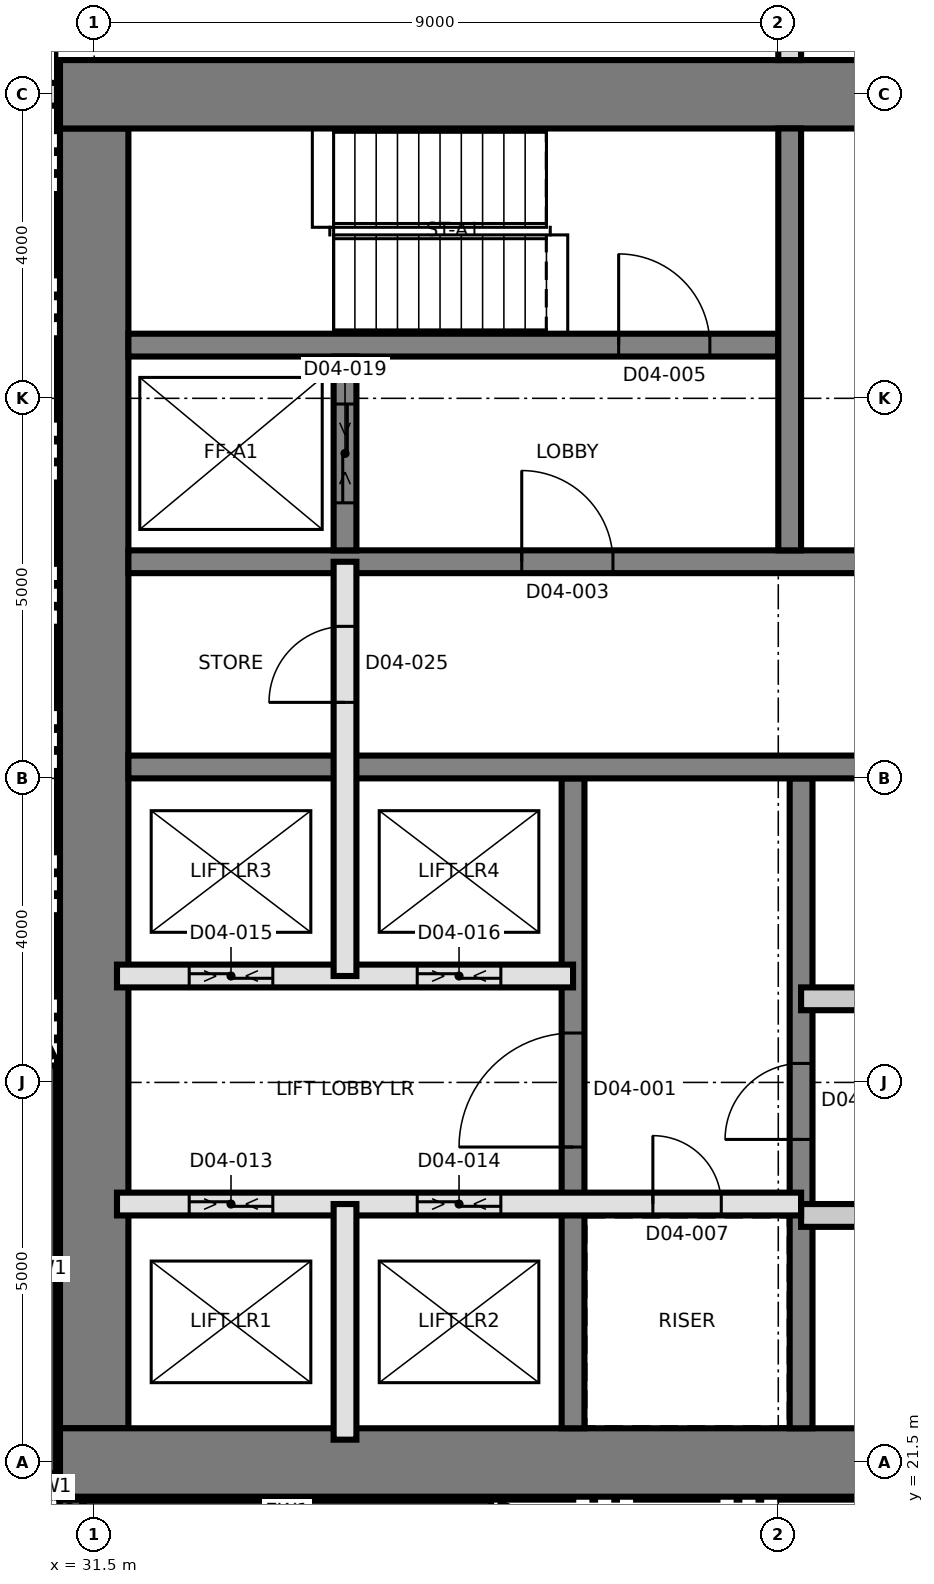
"""IFC4 building model, lengths in metres.
Left out: names, types, materials, properties, quantities, classifications, styles, units other than length and angle.
Written with IfcOpenShell. Run it as: python <this file> out.ifc"""

import sys

from ifc_helpers import new_model, si_unit, direction, frame, frame_2d, origin, place, context, subcontext, project, spatial, rectangle, extrude, element, fill, save


model = new_model("IFC4")
c1 = context("Model", 3, precision=1e-05, world=origin(), true_north=direction((0.0, 1.0)))
c2 = subcontext(c1, "Body", "Model", "MODEL_VIEW")
j1 = project(units=[si_unit("LENGTHUNIT", "METRE"), si_unit("PLANEANGLEUNIT", "RADIAN")], contexts=[c1])
p1 = place(None, origin())
s1 = spatial("IfcSite", under=j1, at=p1, CompositionType="ELEMENT")
p2 = place(p1, origin())
s2 = spatial("IfcBuilding", under=s1, at=p2, CompositionType="ELEMENT")
p3 = place(p2, frame((0.0, 0.0, 66.8)))
s3 = spatial("IfcBuildingStorey", under=s2, at=p3, CompositionType="ELEMENT", Elevation=66.8)
p4 = place(p3, frame((31.5, 21.95, 0.0), z_axis=(0.0, 0.0, 1.0), x_axis=(0.0, 1.0, 0.0)))
e1 = element("IfcWall", 1, at=p4, inside=s3, PredefinedType="SHEAR", context=c2, shape_type="SweptSolid", body=[
    extrude(rectangle(XDim=17.1, YDim=0.9, at=frame_2d((8.55, 0.0))), origin(), (0.0, 0.0, 1.0), 3.7),
])
p5 = place(p3, frame((31.05, 21.5, 0.0), z_axis=(0.0, 0.0, 1.0), x_axis=(1.0, 0.0, 0.0)))
e2 = element("IfcWall", 2, at=p5, inside=s3, PredefinedType="SHEAR", context=c2, shape_type="SweptSolid", body=[
    extrude(rectangle(XDim=27.0, YDim=0.9, at=frame_2d((13.5, 0.0))), origin(), (0.0, 0.0, 1.0), 3.7),
])
p6 = place(p3, frame((31.05, 39.5, 0.0), z_axis=(0.0, 0.0, 1.0), x_axis=(1.0, 0.0, 0.0)))
e3 = element("IfcWall", 3, at=p6, inside=s3, PredefinedType="SHEAR", context=c2, shape_type="SweptSolid", body=[
    extrude(rectangle(XDim=27.0, YDim=0.9, at=frame_2d((13.5, 0.0))), origin(), (0.0, 0.0, 1.0), 3.7),
])
p7 = place(p6, frame((10.65, 0.0, 0.0)))
e4 = element("IfcOpeningElement", 4, at=p7, cuts=e3, PredefinedType="OPENING", context=c2, shape_type="SweptSolid", body=[
    extrude(rectangle(XDim=1.2, YDim=2.1, at=frame_2d((0.6, 1.05))), frame((0.0, 0.46, 0.0), z_axis=(0.0, -1.0, 0.0), x_axis=(1.0, 0.0, 0.0)), (0.0, 0.0, 1.0), 0.92),
])
p8 = place(p3, frame((37.8, 21.95, 0.0), z_axis=(0.0, 0.0, 1.0), x_axis=(0.0, 1.0, 0.0)))
e5 = element("IfcWall", 5, at=p8, inside=s3, PredefinedType="SHEAR", context=c2, shape_type="SweptSolid", body=[
    extrude(rectangle(XDim=8.55, YDim=0.3, at=frame_2d((4.275, 0.0))), origin(), (0.0, 0.0, 1.0), 3.7),
])
p9 = place(p8, frame((3.7, 0.0, 0.0)))
e6 = element("IfcOpeningElement", 6, at=p9, cuts=e5, PredefinedType="OPENING", context=c2, shape_type="SweptSolid", body=[
    extrude(rectangle(XDim=1.5, YDim=2.1, at=frame_2d((0.75, 1.05))), frame((0.0, 0.16, 0.0), z_axis=(0.0, -1.0, 0.0), x_axis=(1.0, 0.0, 0.0)), (0.0, 0.0, 1.0), 0.32),
])
p10 = place(p3, frame((40.8, 21.95, 0.0), z_axis=(0.0, 0.0, 1.0), x_axis=(0.0, 1.0, 0.0)))
e7 = element("IfcWall", 7, at=p10, inside=s3, PredefinedType="SHEAR", context=c2, shape_type="SweptSolid", body=[
    extrude(rectangle(XDim=8.55, YDim=0.3, at=frame_2d((4.275, 0.0))), origin(), (0.0, 0.0, 1.0), 3.7),
])
p11 = place(p10, frame((3.8, 0.0, 0.0)))
e8 = element("IfcOpeningElement", 8, at=p11, cuts=e7, PredefinedType="OPENING", context=c2, shape_type="SweptSolid", body=[
    extrude(rectangle(XDim=1.0, YDim=2.1, at=frame_2d((0.5, 1.05))), frame((0.0, 0.16, 0.0), z_axis=(0.0, -1.0, 0.0), x_axis=(1.0, 0.0, 0.0)), (0.0, 0.0, 1.0), 0.32),
])
p12 = place(p3, frame((31.95, 30.65, 0.0), z_axis=(0.0, 0.0, 1.0), x_axis=(1.0, 0.0, 0.0)))
e9 = element("IfcWall", 9, at=p12, inside=s3, PredefinedType="SHEAR", context=c2, shape_type="SweptSolid", body=[
    extrude(rectangle(XDim=26.1, YDim=0.3, at=frame_2d((13.05, 0.0))), origin(), (0.0, 0.0, 1.0), 3.7),
])
p13 = place(p12, frame((24.55, 0.0, 0.0)))
e10 = element("IfcOpeningElement", 10, at=p13, cuts=e9, PredefinedType="OPENING", context=c2, shape_type="SweptSolid", body=[
    extrude(rectangle(XDim=1.0, YDim=2.1, at=frame_2d((0.5, 1.05))), frame((0.0, 0.16, 0.0), z_axis=(0.0, -1.0, 0.0), x_axis=(1.0, 0.0, 0.0)), (0.0, 0.0, 1.0), 0.32),
])
p14 = place(p12, frame((11.35, 0.0, 0.0)))
e11 = element("IfcOpeningElement", 11, at=p14, cuts=e9, PredefinedType="OPENING", context=c2, shape_type="SweptSolid", body=[
    extrude(rectangle(XDim=1.0, YDim=2.1, at=frame_2d((0.5, 1.05))), frame((0.0, 0.16, 0.0), z_axis=(0.0, -1.0, 0.0), x_axis=(1.0, 0.0, 0.0)), (0.0, 0.0, 1.0), 0.32),
])
p15 = place(p3, frame((31.95, 33.35, 0.0), z_axis=(0.0, 0.0, 1.0), x_axis=(1.0, 0.0, 0.0)))
e12 = element("IfcWall", 12, at=p15, inside=s3, PredefinedType="SHEAR", context=c2, shape_type="SweptSolid", body=[
    extrude(rectangle(XDim=26.1, YDim=0.3, at=frame_2d((13.05, 0.0))), origin(), (0.0, 0.0, 1.0), 3.7),
])
p16 = place(p15, frame((13.7, 0.0, 0.0)))
e13 = element("IfcOpeningElement", 13, at=p16, cuts=e12, PredefinedType="OPENING", context=c2, shape_type="SweptSolid", body=[
    extrude(rectangle(XDim=1.4, YDim=2.1, at=frame_2d((0.7, 1.05))), frame((0.0, 0.16, 0.0), z_axis=(0.0, -1.0, 0.0), x_axis=(1.0, 0.0, 0.0)), (0.0, 0.0, 1.0), 0.32),
])
p17 = place(p15, frame((5.175, 0.0, 0.0)))
e14 = element("IfcOpeningElement", 14, at=p17, cuts=e12, PredefinedType="OPENING", context=c2, shape_type="SweptSolid", body=[
    extrude(rectangle(XDim=1.2, YDim=2.1, at=frame_2d((0.6, 1.05))), frame((0.0, 0.16, 0.0), z_axis=(0.0, -1.0, 0.0), x_axis=(1.0, 0.0, 0.0)), (0.0, 0.0, 1.0), 0.32),
])
p18 = place(p15, frame((19.725, 0.0, 0.0)))
e15 = element("IfcOpeningElement", 15, at=p18, cuts=e12, PredefinedType="OPENING", context=c2, shape_type="SweptSolid", body=[
    extrude(rectangle(XDim=1.2, YDim=2.1, at=frame_2d((0.6, 1.05))), frame((0.0, 0.16, 0.0), z_axis=(0.0, -1.0, 0.0), x_axis=(1.0, 0.0, 0.0)), (0.0, 0.0, 1.0), 0.32),
])
p19 = place(p3, frame((31.95, 36.2, 0.0), z_axis=(0.0, 0.0, 1.0), x_axis=(1.0, 0.0, 0.0)))
e16 = element("IfcWall", 16, at=p19, inside=s3, PredefinedType="SHEAR", context=c2, shape_type="SweptSolid", body=[
    extrude(rectangle(XDim=8.55, YDim=0.3, at=frame_2d((4.275, 0.0))), origin(), (0.0, 0.0, 1.0), 3.7),
])
p20 = place(p19, frame((6.45, 0.0, 0.0)))
e17 = element("IfcOpeningElement", 17, at=p20, cuts=e16, PredefinedType="OPENING", context=c2, shape_type="SweptSolid", body=[
    extrude(rectangle(XDim=1.2, YDim=2.1, at=frame_2d((0.6, 1.05))), frame((0.0, 0.16, 0.0), z_axis=(0.0, -1.0, 0.0), x_axis=(1.0, 0.0, 0.0)), (0.0, 0.0, 1.0), 0.32),
])
p21 = place(p3, frame((40.65, 33.5, 0.0), z_axis=(0.0, 0.0, 1.0), x_axis=(0.0, 1.0, 0.0)))
e18 = element("IfcWall", 18, at=p21, inside=s3, PredefinedType="SHEAR", context=c2, shape_type="SweptSolid", body=[
    extrude(rectangle(XDim=5.55, YDim=0.3, at=frame_2d((2.775, 0.0))), origin(), (0.0, 0.0, 1.0), 3.7),
])
p22 = place(p3, frame((34.8, 33.5, 0.0), z_axis=(0.0, 0.0, 1.0), x_axis=(0.0, 1.0, 0.0)))
e19 = element("IfcWall", 19, at=p22, inside=s3, PredefinedType="SHEAR", context=c2, shape_type="SweptSolid", body=[
    extrude(rectangle(XDim=2.55, YDim=0.3, at=frame_2d((1.275, 0.0))), origin(), (0.0, 0.0, 1.0), 3.7),
])
p23 = place(p22, frame((0.625, 0.0, 0.0)))
e20 = element("IfcOpeningElement", 20, at=p23, cuts=e19, PredefinedType="OPENING", context=c2, shape_type="SweptSolid", body=[
    extrude(rectangle(XDim=1.3, YDim=2.4, at=frame_2d((0.65, 1.2))), frame((0.0, 0.16, 0.0), z_axis=(0.0, -1.0, 0.0), x_axis=(1.0, 0.0, 0.0)), (0.0, 0.0, 1.0), 0.32),
])
p24 = place(p3, frame((30.85, 26.722, 0.0), z_axis=(0.0, 0.0, 1.0), x_axis=(0.0, -1.0, 0.0)))
e21 = element("IfcWall", 21, at=p24, inside=s3, PredefinedType="SOLIDWALL", context=c2, shape_type="SweptSolid", body=[
    extrude(rectangle(XDim=5.362, YDim=0.3, at=frame_2d((2.681, 0.0))), origin(), (0.0, 0.0, 1.0), 3.4),
])
for number, where, z_axis, x_axis in (
    (22, (30.861, 21.302, 0.0), (0.0, 0.0, 1.0), (0.383, -0.924, 0.0)),
    (23, (31.048, 20.967, 0.0), (0.0, 0.0, 1.0), (0.924, -0.383, 0.0)),
):
    element("IfcWall", number, at=place(p3, frame(where, z_axis=z_axis, x_axis=x_axis)), inside=s3, PredefinedType="SOLIDWALL", context=c2, shape_type="SweptSolid", body=[
        extrude(rectangle(XDim=0.275, YDim=0.3, at=frame_2d((0.138, 0.0))), origin(), (0.0, 0.0, 1.0), 3.4),
    ])
p25 = place(p3, frame((31.36, 20.85, 0.0), z_axis=(0.0, 0.0, 1.0), x_axis=(1.0, 0.0, 0.0)))
e24 = element("IfcWall", 24, at=p25, inside=s3, PredefinedType="SOLIDWALL", context=c2, shape_type="SweptSolid", body=[
    extrude(rectangle(XDim=5.362, YDim=0.3, at=frame_2d((2.681, 0.0))), origin(), (0.0, 0.0, 1.0), 3.4),
])
for number, where, z_axis, x_axis in (
    (25, (36.788, 20.834, 0.0), (0.0, 0.0, 1.0), (0.897, -0.442, 0.0)),
    (26, (30.119, 28.24, 0.0), (0.0, 0.0, 1.0), (0.442, -0.897, 0.0)),
):
    element("IfcWall", number, at=place(p3, frame(where, z_axis=z_axis, x_axis=x_axis)), inside=s3, PredefinedType="SOLIDWALL", context=c2, shape_type="SweptSolid", body=[
        extrude(rectangle(XDim=1.618, YDim=0.3, at=frame_2d((0.809, 0.0))), origin(), (0.0, 0.0, 1.0), 3.4),
    ])
p26 = place(p3, frame((40.8, 24.75, 0.0), z_axis=(0.0, 0.0, 1.0), x_axis=(1.0, 0.0, 0.0)))
e27 = element("IfcWall", 27, at=p26, inside=s3, PredefinedType="PARTITIONING", context=c2, shape_type="SweptSolid", body=[
    extrude(rectangle(XDim=6.0, YDim=0.3, at=frame_2d((3.0, 0.0))), origin(), (0.0, 0.0, 1.0), 3.4),
])
p27 = place(p26, frame((2.5, 0.0, 0.0)))
e28 = element("IfcOpeningElement", 28, at=p27, cuts=e27, PredefinedType="OPENING", context=c2, shape_type="SweptSolid", body=[
    extrude(rectangle(XDim=1.0, YDim=2.1, at=frame_2d((0.5, 1.05))), frame((0.0, 0.16, 0.0), z_axis=(0.0, -1.0, 0.0), x_axis=(1.0, 0.0, 0.0)), (0.0, 0.0, 1.0), 0.32),
])
p28 = place(p3, frame((31.8, 24.9, 0.0), z_axis=(0.0, 0.0, 1.0), x_axis=(1.0, 0.0, 0.0)))
e29 = element("IfcWall", 29, at=p28, inside=s3, PredefinedType="SOLIDWALL", context=c2, shape_type="SweptSolid", body=[
    extrude(rectangle(XDim=9.0, YDim=0.3, at=frame_2d((4.5, 0.0))), origin(), (0.0, 0.0, 1.0), 3.4),
])
p29 = place(p28, frame((7.05, 0.0, 0.0)))
e30 = element("IfcOpeningElement", 30, at=p29, cuts=e29, PredefinedType="OPENING", context=c2, shape_type="SweptSolid", body=[
    extrude(rectangle(XDim=0.9, YDim=2.1, at=frame_2d((0.45, 1.05))), frame((0.0, 0.16, 0.0), z_axis=(0.0, -1.0, 0.0), x_axis=(1.0, 0.0, 0.0)), (0.0, 0.0, 1.0), 0.32),
])
p30 = place(p28, frame((0.95, 0.0, 0.0)))
e31 = element("IfcOpeningElement", 31, at=p30, cuts=e29, PredefinedType="OPENING", context=c2, shape_type="SweptSolid", body=[
    extrude(rectangle(XDim=1.1, YDim=2.4, at=frame_2d((0.55, 1.2))), frame((0.0, 0.16, 0.0), z_axis=(0.0, -1.0, 0.0), x_axis=(1.0, 0.0, 0.0)), (0.0, 0.0, 1.0), 0.32),
])
p31 = place(p28, frame((3.95, 0.0, 0.0)))
e32 = element("IfcOpeningElement", 32, at=p31, cuts=e29, PredefinedType="OPENING", context=c2, shape_type="SweptSolid", body=[
    extrude(rectangle(XDim=1.1, YDim=2.4, at=frame_2d((0.55, 1.2))), frame((0.0, 0.16, 0.0), z_axis=(0.0, -1.0, 0.0), x_axis=(1.0, 0.0, 0.0)), (0.0, 0.0, 1.0), 0.32),
])
p32 = place(p3, frame((40.8, 27.6, 0.0), z_axis=(0.0, 0.0, 1.0), x_axis=(1.0, 0.0, 0.0)))
e33 = element("IfcWall", 33, at=p32, inside=s3, PredefinedType="PARTITIONING", context=c2, shape_type="SweptSolid", body=[
    extrude(rectangle(XDim=6.0, YDim=0.3, at=frame_2d((3.0, 0.0))), origin(), (0.0, 0.0, 1.0), 3.4),
])
p33 = place(p3, frame((31.8, 27.9, 0.0), z_axis=(0.0, 0.0, 1.0), x_axis=(1.0, 0.0, 0.0)))
e34 = element("IfcWall", 34, at=p33, inside=s3, PredefinedType="SOLIDWALL", context=c2, shape_type="SweptSolid", body=[
    extrude(rectangle(XDim=6.0, YDim=0.3, at=frame_2d((3.0, 0.0))), origin(), (0.0, 0.0, 1.0), 3.4),
])
p34 = place(p33, frame((0.95, 0.0, 0.0)))
e35 = element("IfcOpeningElement", 35, at=p34, cuts=e34, PredefinedType="OPENING", context=c2, shape_type="SweptSolid", body=[
    extrude(rectangle(XDim=1.1, YDim=2.4, at=frame_2d((0.55, 1.2))), frame((0.0, 0.16, 0.0), z_axis=(0.0, -1.0, 0.0), x_axis=(1.0, 0.0, 0.0)), (0.0, 0.0, 1.0), 0.32),
])
p35 = place(p33, frame((3.95, 0.0, 0.0)))
e36 = element("IfcOpeningElement", 36, at=p35, cuts=e34, PredefinedType="OPENING", context=c2, shape_type="SweptSolid", body=[
    extrude(rectangle(XDim=1.1, YDim=2.4, at=frame_2d((0.55, 1.2))), frame((0.0, 0.16, 0.0), z_axis=(0.0, -1.0, 0.0), x_axis=(1.0, 0.0, 0.0)), (0.0, 0.0, 1.0), 0.32),
])
p36 = place(p3, frame((34.8, 21.8, 0.0), z_axis=(0.0, 0.0, 1.0), x_axis=(0.0, 1.0, 0.0)))
e37 = element("IfcWall", 37, at=p36, inside=s3, PredefinedType="SOLIDWALL", context=c2, shape_type="SweptSolid", body=[
    extrude(rectangle(XDim=3.1, YDim=0.3, at=frame_2d((1.55, 0.0))), origin(), (0.0, 0.0, 1.0), 3.4),
])
p37 = place(p3, frame((34.8, 27.9, 0.0), z_axis=(0.0, 0.0, 1.0), x_axis=(0.0, 1.0, 0.0)))
e38 = element("IfcWall", 38, at=p37, inside=s3, PredefinedType="SOLIDWALL", context=c2, shape_type="SweptSolid", body=[
    extrude(rectangle(XDim=5.45, YDim=0.3, at=frame_2d((2.725, 0.0))), origin(), (0.0, 0.0, 1.0), 3.4),
])
p38 = place(p37, frame((3.6, 0.0, 0.0)))
e39 = element("IfcOpeningElement", 39, at=p38, cuts=e38, PredefinedType="OPENING", context=c2, shape_type="SweptSolid", body=[
    extrude(rectangle(XDim=1.0, YDim=2.1, at=frame_2d((0.5, 1.05))), frame((0.0, 0.16, 0.0), z_axis=(0.0, -1.0, 0.0), x_axis=(1.0, 0.0, 0.0)), (0.0, 0.0, 1.0), 0.32),
])
p39 = place(p3, frame((29.17, 39.5, 0.0), z_axis=(0.0, 0.0, 1.0), x_axis=(1.0, 0.0, 0.0)))
e40 = element("IfcWall", 40, at=p39, inside=s3, PredefinedType="PARTITIONING", context=c2, shape_type="SweptSolid", body=[
    extrude(rectangle(XDim=1.86, YDim=0.3, at=frame_2d((0.93, 0.0))), origin(), (0.0, 0.0, 1.0), 3.35),
])
p40 = place(p3, frame((40.65, 39.95, 0.0), z_axis=(0.0, 0.0, 1.0), x_axis=(0.0, 1.0, 0.0)))
e41 = element("IfcWall", 41, at=p40, inside=s3, PredefinedType="PARTITIONING", context=c2, shape_type="SweptSolid", body=[
    extrude(rectangle(XDim=37.05, YDim=0.3, at=frame_2d((18.525, 0.0))), origin(), (0.0, 0.0, 1.0), 3.35),
])
p41 = place(p40, frame((0.58, 0.0, 0.0)))
e42 = element("IfcOpeningElement", 42, at=p41, cuts=e41, PredefinedType="OPENING", context=c2, shape_type="SweptSolid", body=[
    extrude(rectangle(XDim=1.0, YDim=2.1, at=frame_2d((0.5, 1.05))), frame((0.0, 0.16, 0.0), z_axis=(0.0, -1.0, 0.0), x_axis=(1.0, 0.0, 0.0)), (0.0, 0.0, 1.0), 0.32),
])
p42 = place(p40, frame((6.43, 0.0, 0.0)))
e43 = element("IfcOpeningElement", 43, at=p42, cuts=e41, PredefinedType="OPENING", context=c2, shape_type="SweptSolid", body=[
    extrude(rectangle(XDim=1.0, YDim=2.1, at=frame_2d((0.5, 1.05))), frame((0.0, 0.16, 0.0), z_axis=(0.0, -1.0, 0.0), x_axis=(1.0, 0.0, 0.0)), (0.0, 0.0, 1.0), 0.32),
])
p43 = place(p40, frame((14.2, 0.0, 0.0)))
e44 = element("IfcOpeningElement", 44, at=p43, cuts=e41, PredefinedType="OPENING", context=c2, shape_type="SweptSolid", body=[
    extrude(rectangle(XDim=1.0, YDim=2.4, at=frame_2d((0.5, 1.2))), frame((0.0, 0.16, 0.0), z_axis=(0.0, -1.0, 0.0), x_axis=(1.0, 0.0, 0.0)), (0.0, 0.0, 1.0), 0.32),
])
p44 = place(p40, frame((21.05, 0.0, 0.0)))
e45 = element("IfcOpeningElement", 45, at=p44, cuts=e41, PredefinedType="OPENING", context=c2, shape_type="SweptSolid", body=[
    extrude(rectangle(XDim=1.0, YDim=2.4, at=frame_2d((0.5, 1.2))), frame((0.0, 0.16, 0.0), z_axis=(0.0, -1.0, 0.0), x_axis=(1.0, 0.0, 0.0)), (0.0, 0.0, 1.0), 0.32),
])
p45 = place(p9, origin())
e46 = element("IfcDoor", 46, at=p45, inside=s3, OperationType="SINGLE_SWING_LEFT", PredefinedType="DOOR", context=c2, shape_type="SweptSolid", body=[
    extrude(rectangle(XDim=1.5, YDim=2.1, at=frame_2d((0.75, 1.05))), frame((0.0, 0.025, 0.0), z_axis=(0.0, -1.0, 0.0), x_axis=(1.0, 0.0, 0.0)), (0.0, 0.0, 1.0), 0.05),
])
fill(e6, e46)
p46 = place(p17, origin())
e47 = element("IfcDoor", 47, at=p46, inside=s3, OperationType="SINGLE_SWING_LEFT", PredefinedType="DOOR", context=c2, shape_type="SweptSolid", body=[
    extrude(rectangle(XDim=1.2, YDim=2.1, at=frame_2d((0.6, 1.05))), frame((0.0, 0.025, 0.0), z_axis=(0.0, -1.0, 0.0), x_axis=(1.0, 0.0, 0.0)), (0.0, 0.0, 1.0), 0.05),
])
fill(e14, e47)
p47 = place(p20, origin())
e48 = element("IfcDoor", 48, at=p47, inside=s3, OperationType="SINGLE_SWING_RIGHT", PredefinedType="DOOR", context=c2, shape_type="SweptSolid", body=[
    extrude(rectangle(XDim=1.2, YDim=2.1, at=frame_2d((0.6, 1.05))), frame((0.0, 0.025, 0.0), z_axis=(0.0, -1.0, 0.0), x_axis=(1.0, 0.0, 0.0)), (0.0, 0.0, 1.0), 0.05),
])
fill(e17, e48)
p48 = place(p29, origin())
e49 = element("IfcDoor", 49, at=p48, inside=s3, OperationType="SINGLE_SWING_LEFT", PredefinedType="DOOR", context=c2, shape_type="SweptSolid", body=[
    extrude(rectangle(XDim=0.9, YDim=2.1, at=frame_2d((0.45, 1.05))), frame((0.0, 0.025, 0.0), z_axis=(0.0, -1.0, 0.0), x_axis=(1.0, 0.0, 0.0)), (0.0, 0.0, 1.0), 0.05),
])
fill(e30, e49)
p49 = place(p30, origin())
e50 = element("IfcDoor", 50, at=p49, inside=s3, OperationType="SLIDING_TO_LEFT", PredefinedType="DOOR", context=c2, shape_type="SweptSolid", body=[
    extrude(rectangle(XDim=1.1, YDim=2.4, at=frame_2d((0.55, 1.2))), frame((0.0, 0.025, 0.0), z_axis=(0.0, -1.0, 0.0), x_axis=(1.0, 0.0, 0.0)), (0.0, 0.0, 1.0), 0.05),
])
fill(e31, e50)
p50 = place(p31, origin())
e51 = element("IfcDoor", 51, at=p50, inside=s3, OperationType="SLIDING_TO_LEFT", PredefinedType="DOOR", context=c2, shape_type="SweptSolid", body=[
    extrude(rectangle(XDim=1.1, YDim=2.4, at=frame_2d((0.55, 1.2))), frame((0.0, 0.025, 0.0), z_axis=(0.0, -1.0, 0.0), x_axis=(1.0, 0.0, 0.0)), (0.0, 0.0, 1.0), 0.05),
])
fill(e32, e51)
p51 = place(p34, origin())
e52 = element("IfcDoor", 52, at=p51, inside=s3, OperationType="SLIDING_TO_LEFT", PredefinedType="DOOR", context=c2, shape_type="SweptSolid", body=[
    extrude(rectangle(XDim=1.1, YDim=2.4, at=frame_2d((0.55, 1.2))), frame((0.0, 0.025, 0.0), z_axis=(0.0, -1.0, 0.0), x_axis=(1.0, 0.0, 0.0)), (0.0, 0.0, 1.0), 0.05),
])
fill(e35, e52)
p52 = place(p35, origin())
e53 = element("IfcDoor", 53, at=p52, inside=s3, OperationType="SLIDING_TO_LEFT", PredefinedType="DOOR", context=c2, shape_type="SweptSolid", body=[
    extrude(rectangle(XDim=1.1, YDim=2.4, at=frame_2d((0.55, 1.2))), frame((0.0, 0.025, 0.0), z_axis=(0.0, -1.0, 0.0), x_axis=(1.0, 0.0, 0.0)), (0.0, 0.0, 1.0), 0.05),
])
fill(e36, e53)
p53 = place(p23, origin())
e54 = element("IfcDoor", 54, at=p53, inside=s3, OperationType="SLIDING_TO_LEFT", PredefinedType="DOOR", context=c2, shape_type="SweptSolid", body=[
    extrude(rectangle(XDim=1.3, YDim=2.4, at=frame_2d((0.65, 1.2))), frame((0.0, 0.025, 0.0), z_axis=(0.0, -1.0, 0.0), x_axis=(1.0, 0.0, 0.0)), (0.0, 0.0, 1.0), 0.05),
])
fill(e20, e54)
p54 = place(p11, origin())
e55 = element("IfcDoor", 55, at=p54, inside=s3, OperationType="SINGLE_SWING_RIGHT", PredefinedType="DOOR", context=c2, shape_type="SweptSolid", body=[
    extrude(rectangle(XDim=1.0, YDim=2.1, at=frame_2d((0.5, 1.05))), frame((0.0, 0.025, 0.0), z_axis=(0.0, -1.0, 0.0), x_axis=(1.0, 0.0, 0.0)), (0.0, 0.0, 1.0), 0.05),
])
fill(e8, e55)
p55 = place(p38, origin())
e56 = element("IfcDoor", 56, at=p55, inside=s3, OperationType="SINGLE_SWING_LEFT", PredefinedType="DOOR", context=c2, shape_type="SweptSolid", body=[
    extrude(rectangle(XDim=1.0, YDim=2.1, at=frame_2d((0.5, 1.05))), frame((0.0, 0.025, 0.0), z_axis=(0.0, -1.0, 0.0), x_axis=(1.0, 0.0, 0.0)), (0.0, 0.0, 1.0), 0.05),
])
fill(e39, e56)
save(model, sys.argv[1])
